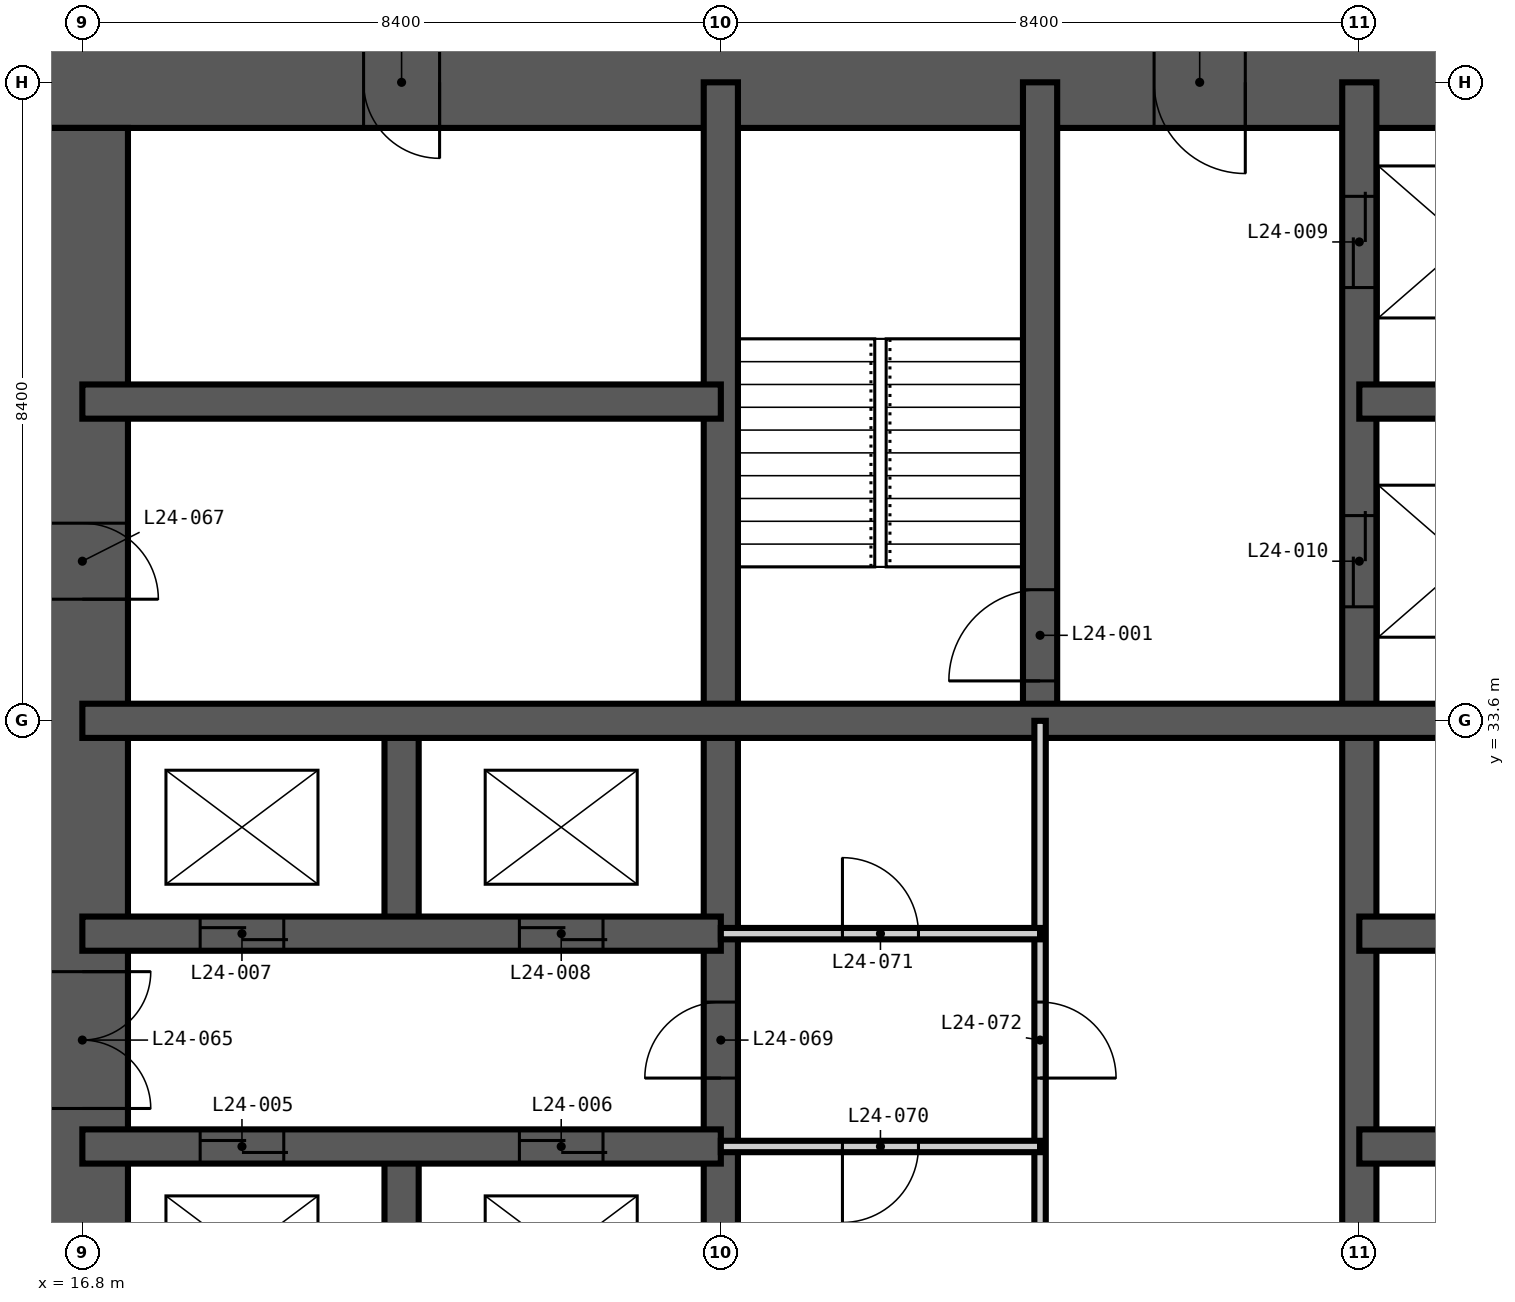
"""IFC4 building model, lengths in metres.
Left out: names, types, materials, properties, quantities, classifications, styles, units other than length and angle.
Written with IfcOpenShell. Run it as: python <this file> out.ifc"""

import sys

from ifc_helpers import new_model, si_unit, direction, frame, frame_2d, origin, place, context, subcontext, project, spatial, rectangle, extrude, element, fill, save


model = new_model("IFC4")
c1 = context("Model", 3, precision=1e-05, world=origin(), true_north=direction((0.0, 1.0)))
c2 = subcontext(c1, "Body", "Model", "MODEL_VIEW")
j1 = project(units=[si_unit("LENGTHUNIT", "METRE"), si_unit("PLANEANGLEUNIT", "RADIAN")], contexts=[c1])
p1 = place(None, origin())
s1 = spatial("IfcSite", under=j1, at=p1, CompositionType="ELEMENT")
p2 = place(p1, origin())
s2 = spatial("IfcBuilding", under=s1, at=p2, CompositionType="ELEMENT")
p3 = place(p2, frame((0.0, 0.0, 97.2)))
s3 = spatial("IfcBuildingStorey", under=s2, at=p3, CompositionType="ELEMENT", Elevation=97.2)
p4 = place(p3, frame((42.6, 42.0, -0.35), z_axis=(0.0, 0.0, 1.0), x_axis=(-1.0, 0.0, 0.0)))
e1 = element("IfcWall", 1, at=p4, inside=s3, PredefinedType="SHEAR", context=c2, shape_type="SweptSolid", body=[
    extrude(rectangle(XDim=26.4, YDim=1.2, at=frame_2d((13.2, 0.0))), origin(), (0.0, 0.0, 1.0), 3.6),
])
p5 = place(p4, frame((21.1, 0.0, 0.35)))
e2 = element("IfcOpeningElement", 2, at=p5, cuts=e1, PredefinedType="OPENING", context=c2, shape_type="SweptSolid", body=[
    extrude(rectangle(XDim=1.0, YDim=2.1, at=frame_2d((0.5, 1.05))), frame((0.0, 0.61, 0.0), z_axis=(0.0, -1.0, 0.0), x_axis=(1.0, 0.0, 0.0)), (0.0, 0.0, 1.0), 1.22),
])
p6 = place(p4, frame((10.5, 0.0, 0.35)))
e3 = element("IfcOpeningElement", 3, at=p6, cuts=e1, PredefinedType="OPENING", context=c2, shape_type="SweptSolid", body=[
    extrude(rectangle(XDim=1.2, YDim=2.2, at=frame_2d((0.6, 1.1))), frame((0.0, 0.61, 0.0), z_axis=(0.0, -1.0, 0.0), x_axis=(1.0, 0.0, 0.0)), (0.0, 0.0, 1.0), 1.22),
])
p7 = place(p3, frame((16.8, 41.4, -0.35), z_axis=(0.0, 0.0, 1.0), x_axis=(0.0, -1.0, 0.0)))
e4 = element("IfcWall", 4, at=p7, inside=s3, PredefinedType="SHEAR", context=c2, shape_type="SweptSolid", body=[
    extrude(rectangle(XDim=24.0, YDim=1.2, at=frame_2d((12.0, 0.0))), origin(), (0.0, 0.0, 1.0), 3.6),
])
p8 = place(p7, frame((11.1, 0.0, 0.35)))
e5 = element("IfcOpeningElement", 5, at=p8, cuts=e4, PredefinedType="OPENING", context=c2, shape_type="SweptSolid", body=[
    extrude(rectangle(XDim=1.8, YDim=2.2, at=frame_2d((0.9, 1.1))), frame((0.0, 0.61, 0.0), z_axis=(0.0, -1.0, 0.0), x_axis=(1.0, 0.0, 0.0)), (0.0, 0.0, 1.0), 1.22),
])
p9 = place(p7, frame((19.9, 0.0, 0.35)))
e6 = element("IfcOpeningElement", 6, at=p9, cuts=e4, PredefinedType="OPENING", context=c2, shape_type="SweptSolid", body=[
    extrude(rectangle(XDim=1.0, YDim=2.1, at=frame_2d((0.5, 1.05))), frame((0.0, 0.61, 0.0), z_axis=(0.0, -1.0, 0.0), x_axis=(1.0, 0.0, 0.0)), (0.0, 0.0, 1.0), 1.22),
])
p10 = place(p7, frame((5.2, 0.0, 0.35)))
e7 = element("IfcOpeningElement", 7, at=p10, cuts=e4, PredefinedType="OPENING", context=c2, shape_type="SweptSolid", body=[
    extrude(rectangle(XDim=1.0, YDim=2.1, at=frame_2d((0.5, 1.05))), frame((0.0, 0.61, 0.0), z_axis=(0.0, -1.0, 0.0), x_axis=(1.0, 0.0, 0.0)), (0.0, 0.0, 1.0), 1.22),
])
p11 = place(p3, frame((21.0, 22.4, -0.35), z_axis=(0.0, 0.0, 1.0), x_axis=(0.0, 1.0, 0.0)))
e8 = element("IfcWall", 8, at=p11, inside=s3, PredefinedType="SHEAR", context=c2, shape_type="SweptSolid", body=[
    extrude(rectangle(XDim=5.6, YDim=0.45, at=frame_2d((2.8, 0.0))), origin(), (0.0, 0.0, 1.0), 3.6),
])
p12 = place(p3, frame((21.0, 30.8, -0.35), z_axis=(0.0, 0.0, 1.0), x_axis=(0.0, 1.0, 0.0)))
e9 = element("IfcWall", 9, at=p12, inside=s3, PredefinedType="SHEAR", context=c2, shape_type="SweptSolid", body=[
    extrude(rectangle(XDim=2.8, YDim=0.45, at=frame_2d((1.4, 0.0))), origin(), (0.0, 0.0, 1.0), 3.6),
])
p13 = place(p3, frame((25.2, 16.8, -0.35), z_axis=(0.0, 0.0, 1.0), x_axis=(0.0, 1.0, 0.0)))
e10 = element("IfcWall", 10, at=p13, inside=s3, PredefinedType="SHEAR", context=c2, shape_type="SweptSolid", body=[
    extrude(rectangle(XDim=25.2, YDim=0.45, at=frame_2d((12.6, 0.0))), origin(), (0.0, 0.0, 1.0), 3.6),
])
p14 = place(p13, frame((12.1, 0.0, 0.35)))
e11 = element("IfcOpeningElement", 11, at=p14, cuts=e10, PredefinedType="OPENING", context=c2, shape_type="SweptSolid", body=[
    extrude(rectangle(XDim=1.0, YDim=2.1, at=frame_2d((0.5, 1.05))), frame((0.0, 0.235, 0.0), z_axis=(0.0, -1.0, 0.0), x_axis=(1.0, 0.0, 0.0)), (0.0, 0.0, 1.0), 0.47),
])
p15 = place(p3, frame((29.4, 33.6, -0.35), z_axis=(0.0, 0.0, 1.0), x_axis=(0.0, 1.0, 0.0)))
e12 = element("IfcWall", 12, at=p15, inside=s3, PredefinedType="SHEAR", context=c2, shape_type="SweptSolid", body=[
    extrude(rectangle(XDim=8.4, YDim=0.45, at=frame_2d((4.2, 0.0))), origin(), (0.0, 0.0, 1.0), 3.6),
])
p16 = place(p15, frame((0.525, 0.0, 0.35)))
e13 = element("IfcOpeningElement", 13, at=p16, cuts=e12, PredefinedType="OPENING", context=c2, shape_type="SweptSolid", body=[
    extrude(rectangle(XDim=1.2, YDim=2.2, at=frame_2d((0.6, 1.1))), frame((0.0, 0.235, 0.0), z_axis=(0.0, -1.0, 0.0), x_axis=(1.0, 0.0, 0.0)), (0.0, 0.0, 1.0), 0.47),
])
p17 = place(p3, frame((33.6, 16.8, -0.35), z_axis=(0.0, 0.0, 1.0), x_axis=(0.0, 1.0, 0.0)))
e14 = element("IfcWall", 14, at=p17, inside=s3, PredefinedType="SHEAR", context=c2, shape_type="SweptSolid", body=[
    extrude(rectangle(XDim=25.2, YDim=0.45, at=frame_2d((12.6, 0.0))), origin(), (0.0, 0.0, 1.0), 3.6),
])
p18 = place(p17, frame((22.5, 0.0, 0.35)))
e15 = element("IfcOpeningElement", 15, at=p18, cuts=e14, PredefinedType="OPENING", context=c2, shape_type="SweptSolid", body=[
    extrude(rectangle(XDim=1.2, YDim=2.2, at=frame_2d((0.6, 1.1))), frame((0.0, 0.235, 0.0), z_axis=(0.0, -1.0, 0.0), x_axis=(1.0, 0.0, 0.0)), (0.0, 0.0, 1.0), 0.47),
])
p19 = place(p17, frame((18.3, 0.0, 0.35)))
e16 = element("IfcOpeningElement", 16, at=p19, cuts=e14, PredefinedType="OPENING", context=c2, shape_type="SweptSolid", body=[
    extrude(rectangle(XDim=1.2, YDim=2.2, at=frame_2d((0.6, 1.1))), frame((0.0, 0.235, 0.0), z_axis=(0.0, -1.0, 0.0), x_axis=(1.0, 0.0, 0.0)), (0.0, 0.0, 1.0), 0.47),
])
p20 = place(p3, frame((16.8, 28.0, -0.35), z_axis=(0.0, 0.0, 1.0), x_axis=(1.0, 0.0, 0.0)))
e17 = element("IfcWall", 17, at=p20, inside=s3, PredefinedType="SHEAR", context=c2, shape_type="SweptSolid", body=[
    extrude(rectangle(XDim=8.4, YDim=0.45, at=frame_2d((4.2, 0.0))), origin(), (0.0, 0.0, 1.0), 3.6),
])
p21 = place(p20, frame((1.55, 0.0, 0.35)))
e18 = element("IfcOpeningElement", 18, at=p21, cuts=e17, PredefinedType="OPENING", context=c2, shape_type="SweptSolid", body=[
    extrude(rectangle(XDim=1.1, YDim=2.2, at=frame_2d((0.55, 1.1))), frame((0.0, 0.235, 0.0), z_axis=(0.0, -1.0, 0.0), x_axis=(1.0, 0.0, 0.0)), (0.0, 0.0, 1.0), 0.47),
])
p22 = place(p20, frame((5.75, 0.0, 0.35)))
e19 = element("IfcOpeningElement", 19, at=p22, cuts=e17, PredefinedType="OPENING", context=c2, shape_type="SweptSolid", body=[
    extrude(rectangle(XDim=1.1, YDim=2.2, at=frame_2d((0.55, 1.1))), frame((0.0, 0.235, 0.0), z_axis=(0.0, -1.0, 0.0), x_axis=(1.0, 0.0, 0.0)), (0.0, 0.0, 1.0), 0.47),
])
p23 = place(p3, frame((33.6, 28.0, -0.35), z_axis=(0.0, 0.0, 1.0), x_axis=(1.0, 0.0, 0.0)))
e20 = element("IfcWall", 20, at=p23, inside=s3, PredefinedType="SHEAR", context=c2, shape_type="SweptSolid", body=[
    extrude(rectangle(XDim=8.4, YDim=0.45, at=frame_2d((4.2, 0.0))), origin(), (0.0, 0.0, 1.0), 3.6),
])
p24 = place(p23, frame((1.55, 0.0, 0.35)))
e21 = element("IfcOpeningElement", 21, at=p24, cuts=e20, PredefinedType="OPENING", context=c2, shape_type="SweptSolid", body=[
    extrude(rectangle(XDim=1.1, YDim=2.2, at=frame_2d((0.55, 1.1))), frame((0.0, 0.235, 0.0), z_axis=(0.0, -1.0, 0.0), x_axis=(1.0, 0.0, 0.0)), (0.0, 0.0, 1.0), 0.47),
])
p25 = place(p23, frame((5.75, 0.0, 0.35)))
e22 = element("IfcOpeningElement", 22, at=p25, cuts=e20, PredefinedType="OPENING", context=c2, shape_type="SweptSolid", body=[
    extrude(rectangle(XDim=1.1, YDim=2.2, at=frame_2d((0.55, 1.1))), frame((0.0, 0.235, 0.0), z_axis=(0.0, -1.0, 0.0), x_axis=(1.0, 0.0, 0.0)), (0.0, 0.0, 1.0), 0.47),
])
p26 = place(p3, frame((16.8, 30.8, -0.35), z_axis=(0.0, 0.0, 1.0), x_axis=(1.0, 0.0, 0.0)))
e23 = element("IfcWall", 23, at=p26, inside=s3, PredefinedType="SHEAR", context=c2, shape_type="SweptSolid", body=[
    extrude(rectangle(XDim=8.4, YDim=0.45, at=frame_2d((4.2, 0.0))), origin(), (0.0, 0.0, 1.0), 3.6),
])
p27 = place(p26, frame((1.55, 0.0, 0.35)))
e24 = element("IfcOpeningElement", 24, at=p27, cuts=e23, PredefinedType="OPENING", context=c2, shape_type="SweptSolid", body=[
    extrude(rectangle(XDim=1.1, YDim=2.2, at=frame_2d((0.55, 1.1))), frame((0.0, 0.235, 0.0), z_axis=(0.0, -1.0, 0.0), x_axis=(1.0, 0.0, 0.0)), (0.0, 0.0, 1.0), 0.47),
])
p28 = place(p26, frame((5.75, 0.0, 0.35)))
e25 = element("IfcOpeningElement", 25, at=p28, cuts=e23, PredefinedType="OPENING", context=c2, shape_type="SweptSolid", body=[
    extrude(rectangle(XDim=1.1, YDim=2.2, at=frame_2d((0.55, 1.1))), frame((0.0, 0.235, 0.0), z_axis=(0.0, -1.0, 0.0), x_axis=(1.0, 0.0, 0.0)), (0.0, 0.0, 1.0), 0.47),
])
p29 = place(p3, frame((33.6, 30.8, -0.35), z_axis=(0.0, 0.0, 1.0), x_axis=(1.0, 0.0, 0.0)))
e26 = element("IfcWall", 26, at=p29, inside=s3, PredefinedType="SHEAR", context=c2, shape_type="SweptSolid", body=[
    extrude(rectangle(XDim=8.4, YDim=0.45, at=frame_2d((4.2, 0.0))), origin(), (0.0, 0.0, 1.0), 3.6),
])
p30 = place(p3, frame((16.8, 33.6, -0.35), z_axis=(0.0, 0.0, 1.0), x_axis=(1.0, 0.0, 0.0)))
e27 = element("IfcWall", 27, at=p30, inside=s3, PredefinedType="SHEAR", context=c2, shape_type="SweptSolid", body=[
    extrude(rectangle(XDim=25.2, YDim=0.45, at=frame_2d((12.6, 0.0))), origin(), (0.0, 0.0, 1.0), 3.6),
])
p31 = place(p30, frame((22.6, 0.0, 0.35)))
e28 = element("IfcOpeningElement", 28, at=p31, cuts=e27, PredefinedType="OPENING", context=c2, shape_type="SweptSolid", body=[
    extrude(rectangle(XDim=1.0, YDim=2.1, at=frame_2d((0.5, 1.05))), frame((0.0, 0.235, 0.0), z_axis=(0.0, -1.0, 0.0), x_axis=(1.0, 0.0, 0.0)), (0.0, 0.0, 1.0), 0.47),
])
p32 = place(p3, frame((16.8, 37.8, -0.35), z_axis=(0.0, 0.0, 1.0), x_axis=(1.0, 0.0, 0.0)))
e29 = element("IfcWall", 29, at=p32, inside=s3, PredefinedType="SHEAR", context=c2, shape_type="SweptSolid", body=[
    extrude(rectangle(XDim=8.4, YDim=0.45, at=frame_2d((4.2, 0.0))), origin(), (0.0, 0.0, 1.0), 3.6),
])
p33 = place(p3, frame((33.6, 37.8, -0.35), z_axis=(0.0, 0.0, 1.0), x_axis=(1.0, 0.0, 0.0)))
e30 = element("IfcWall", 30, at=p33, inside=s3, PredefinedType="SHEAR", context=c2, shape_type="SweptSolid", body=[
    extrude(rectangle(XDim=2.8, YDim=0.45, at=frame_2d((1.4, 0.0))), origin(), (0.0, 0.0, 1.0), 3.6),
])
p34 = place(p3, frame((29.4, 25.2, 0.0), z_axis=(0.0, 0.0, 1.0), x_axis=(0.0, 1.0, 0.0)))
e31 = element("IfcWall", 31, at=p34, inside=s3, PredefinedType="PARTITIONING", context=c2, shape_type="SweptSolid", body=[
    extrude(rectangle(XDim=8.4, YDim=0.15, at=frame_2d((4.2, 0.0))), origin(), (0.0, 0.0, 1.0), 3.25),
])
p35 = place(p34, frame((3.7, 0.0, 0.0)))
e32 = element("IfcOpeningElement", 32, at=p35, cuts=e31, PredefinedType="OPENING", context=c2, shape_type="SweptSolid", body=[
    extrude(rectangle(XDim=1.0, YDim=2.1, at=frame_2d((0.5, 1.05))), frame((0.0, 0.085, 0.0), z_axis=(0.0, -1.0, 0.0), x_axis=(1.0, 0.0, 0.0)), (0.0, 0.0, 1.0), 0.17),
])
p36 = place(p3, frame((25.2, 28.0, 0.0), z_axis=(0.0, 0.0, 1.0), x_axis=(1.0, 0.0, 0.0)))
e33 = element("IfcWall", 33, at=p36, inside=s3, PredefinedType="PARTITIONING", context=c2, shape_type="SweptSolid", body=[
    extrude(rectangle(XDim=4.2, YDim=0.15, at=frame_2d((2.1, 0.0))), origin(), (0.0, 0.0, 1.0), 3.25),
])
p37 = place(p36, frame((1.6, 0.0, 0.0)))
e34 = element("IfcOpeningElement", 34, at=p37, cuts=e33, PredefinedType="OPENING", context=c2, shape_type="SweptSolid", body=[
    extrude(rectangle(XDim=1.0, YDim=2.1, at=frame_2d((0.5, 1.05))), frame((0.0, 0.085, 0.0), z_axis=(0.0, -1.0, 0.0), x_axis=(1.0, 0.0, 0.0)), (0.0, 0.0, 1.0), 0.17),
])
p38 = place(p3, frame((25.2, 30.8, 0.0), z_axis=(0.0, 0.0, 1.0), x_axis=(1.0, 0.0, 0.0)))
e35 = element("IfcWall", 35, at=p38, inside=s3, PredefinedType="PARTITIONING", context=c2, shape_type="SweptSolid", body=[
    extrude(rectangle(XDim=4.2, YDim=0.15, at=frame_2d((2.1, 0.0))), origin(), (0.0, 0.0, 1.0), 3.25),
])
p39 = place(p38, frame((1.6, 0.0, 0.0)))
e36 = element("IfcOpeningElement", 36, at=p39, cuts=e35, PredefinedType="OPENING", context=c2, shape_type="SweptSolid", body=[
    extrude(rectangle(XDim=1.0, YDim=2.1, at=frame_2d((0.5, 1.05))), frame((0.0, 0.085, 0.0), z_axis=(0.0, -1.0, 0.0), x_axis=(1.0, 0.0, 0.0)), (0.0, 0.0, 1.0), 0.17),
])
p40 = place(p16, origin())
e37 = element("IfcDoor", 37, at=p40, inside=s3, OperationType="SINGLE_SWING_LEFT", PredefinedType="DOOR", context=c2, shape_type="SweptSolid", body=[
    extrude(rectangle(XDim=1.2, YDim=2.2, at=frame_2d((0.6, 1.1))), frame((0.0, 0.025, 0.0), z_axis=(0.0, -1.0, 0.0), x_axis=(1.0, 0.0, 0.0)), (0.0, 0.0, 1.0), 0.05),
])
fill(e13, e37)
p41 = place(p21, origin())
e38 = element("IfcDoor", 38, at=p41, inside=s3, OperationType="DOUBLE_DOOR_SLIDING", PredefinedType="DOOR", context=c2, shape_type="SweptSolid", body=[
    extrude(rectangle(XDim=1.1, YDim=2.2, at=frame_2d((0.55, 1.1))), frame((0.0, 0.025, 0.0), z_axis=(0.0, -1.0, 0.0), x_axis=(1.0, 0.0, 0.0)), (0.0, 0.0, 1.0), 0.05),
])
fill(e18, e38)
p42 = place(p22, origin())
e39 = element("IfcDoor", 39, at=p42, inside=s3, OperationType="DOUBLE_DOOR_SLIDING", PredefinedType="DOOR", context=c2, shape_type="SweptSolid", body=[
    extrude(rectangle(XDim=1.1, YDim=2.2, at=frame_2d((0.55, 1.1))), frame((0.0, 0.025, 0.0), z_axis=(0.0, -1.0, 0.0), x_axis=(1.0, 0.0, 0.0)), (0.0, 0.0, 1.0), 0.05),
])
fill(e19, e39)
p43 = place(p27, origin())
e40 = element("IfcDoor", 40, at=p43, inside=s3, OperationType="DOUBLE_DOOR_SLIDING", PredefinedType="DOOR", context=c2, shape_type="SweptSolid", body=[
    extrude(rectangle(XDim=1.1, YDim=2.2, at=frame_2d((0.55, 1.1))), frame((0.0, 0.025, 0.0), z_axis=(0.0, -1.0, 0.0), x_axis=(1.0, 0.0, 0.0)), (0.0, 0.0, 1.0), 0.05),
])
fill(e24, e40)
p44 = place(p28, origin())
e41 = element("IfcDoor", 41, at=p44, inside=s3, OperationType="DOUBLE_DOOR_SLIDING", PredefinedType="DOOR", context=c2, shape_type="SweptSolid", body=[
    extrude(rectangle(XDim=1.1, YDim=2.2, at=frame_2d((0.55, 1.1))), frame((0.0, 0.025, 0.0), z_axis=(0.0, -1.0, 0.0), x_axis=(1.0, 0.0, 0.0)), (0.0, 0.0, 1.0), 0.05),
])
fill(e25, e41)
p45 = place(p18, origin())
e42 = element("IfcDoor", 42, at=p45, inside=s3, OperationType="DOUBLE_DOOR_SLIDING", PredefinedType="DOOR", context=c2, shape_type="SweptSolid", body=[
    extrude(rectangle(XDim=1.2, YDim=2.2, at=frame_2d((0.6, 1.1))), frame((0.0, 0.025, 0.0), z_axis=(0.0, -1.0, 0.0), x_axis=(1.0, 0.0, 0.0)), (0.0, 0.0, 1.0), 0.05),
])
fill(e15, e42)
p46 = place(p19, origin())
e43 = element("IfcDoor", 43, at=p46, inside=s3, OperationType="DOUBLE_DOOR_SLIDING", PredefinedType="DOOR", context=c2, shape_type="SweptSolid", body=[
    extrude(rectangle(XDim=1.2, YDim=2.2, at=frame_2d((0.6, 1.1))), frame((0.0, 0.025, 0.0), z_axis=(0.0, -1.0, 0.0), x_axis=(1.0, 0.0, 0.0)), (0.0, 0.0, 1.0), 0.05),
])
fill(e16, e43)
p47 = place(p8, origin())
e44 = element("IfcDoor", 44, at=p47, inside=s3, OperationType="DOUBLE_DOOR_DOUBLE_SWING", PredefinedType="DOOR", context=c2, shape_type="SweptSolid", body=[
    extrude(rectangle(XDim=1.8, YDim=2.2, at=frame_2d((0.9, 1.1))), frame((0.0, 0.025, 0.0), z_axis=(0.0, -1.0, 0.0), x_axis=(1.0, 0.0, 0.0)), (0.0, 0.0, 1.0), 0.05),
])
fill(e5, e44)
p48 = place(p10, origin())
e45 = element("IfcDoor", 45, at=p48, inside=s3, OperationType="SINGLE_SWING_RIGHT", PredefinedType="DOOR", context=c2, shape_type="SweptSolid", body=[
    extrude(rectangle(XDim=1.0, YDim=2.1, at=frame_2d((0.5, 1.05))), frame((0.0, 0.025, 0.0), z_axis=(0.0, -1.0, 0.0), x_axis=(1.0, 0.0, 0.0)), (0.0, 0.0, 1.0), 0.05),
])
fill(e7, e45)
p49 = place(p5, origin())
e46 = element("IfcDoor", 46, at=p49, inside=s3, OperationType="SINGLE_SWING_LEFT", PredefinedType="DOOR", context=c2, shape_type="SweptSolid", body=[
    extrude(rectangle(XDim=1.0, YDim=2.1, at=frame_2d((0.5, 1.05))), frame((0.0, 0.025, 0.0), z_axis=(0.0, -1.0, 0.0), x_axis=(1.0, 0.0, 0.0)), (0.0, 0.0, 1.0), 0.05),
])
fill(e2, e46)
p50 = place(p14, origin())
e47 = element("IfcDoor", 47, at=p50, inside=s3, OperationType="SINGLE_SWING_LEFT", PredefinedType="DOOR", context=c2, shape_type="SweptSolid", body=[
    extrude(rectangle(XDim=1.0, YDim=2.1, at=frame_2d((0.5, 1.05))), frame((0.0, 0.025, 0.0), z_axis=(0.0, -1.0, 0.0), x_axis=(1.0, 0.0, 0.0)), (0.0, 0.0, 1.0), 0.05),
])
fill(e11, e47)
p51 = place(p37, frame((1.0, 0.0, 0.0), z_axis=(0.0, 0.0, 1.0), x_axis=(-1.0, 0.0, 0.0)))
e48 = element("IfcDoor", 48, at=p51, inside=s3, OperationType="SINGLE_SWING_RIGHT", PredefinedType="DOOR", context=c2, shape_type="SweptSolid", body=[
    extrude(rectangle(XDim=1.0, YDim=2.1, at=frame_2d((0.5, 1.05))), frame((0.0, 0.025, 0.0), z_axis=(0.0, -1.0, 0.0), x_axis=(1.0, 0.0, 0.0)), (0.0, 0.0, 1.0), 0.05),
])
fill(e34, e48)
p52 = place(p39, origin())
e49 = element("IfcDoor", 49, at=p52, inside=s3, OperationType="SINGLE_SWING_LEFT", PredefinedType="DOOR", context=c2, shape_type="SweptSolid", body=[
    extrude(rectangle(XDim=1.0, YDim=2.1, at=frame_2d((0.5, 1.05))), frame((0.0, 0.025, 0.0), z_axis=(0.0, -1.0, 0.0), x_axis=(1.0, 0.0, 0.0)), (0.0, 0.0, 1.0), 0.05),
])
fill(e36, e49)
p53 = place(p35, frame((1.0, 0.0, 0.0), z_axis=(0.0, 0.0, 1.0), x_axis=(-1.0, 0.0, 0.0)))
e50 = element("IfcDoor", 50, at=p53, inside=s3, OperationType="SINGLE_SWING_RIGHT", PredefinedType="DOOR", context=c2, shape_type="SweptSolid", body=[
    extrude(rectangle(XDim=1.0, YDim=2.1, at=frame_2d((0.5, 1.05))), frame((0.0, 0.025, 0.0), z_axis=(0.0, -1.0, 0.0), x_axis=(1.0, 0.0, 0.0)), (0.0, 0.0, 1.0), 0.05),
])
fill(e32, e50)
p54 = place(p6, origin())
e51 = element("IfcDoor", 51, at=p54, inside=s3, OperationType="SINGLE_SWING_LEFT", PredefinedType="DOOR", context=c2, shape_type="SweptSolid", body=[
    extrude(rectangle(XDim=1.2, YDim=2.2, at=frame_2d((0.6, 1.1))), frame((0.0, 0.025, 0.0), z_axis=(0.0, -1.0, 0.0), x_axis=(1.0, 0.0, 0.0)), (0.0, 0.0, 1.0), 0.05),
])
fill(e3, e51)
save(model, sys.argv[1])
